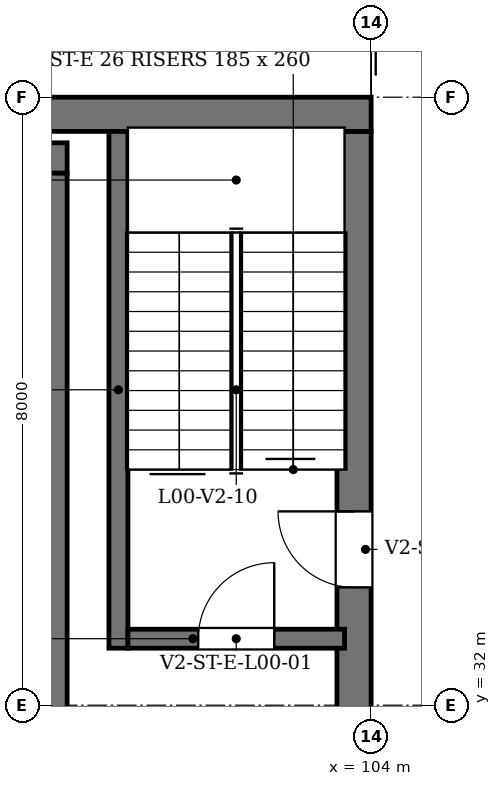
"""IFC4 building model, lengths in metres.
Left out: names, types, materials, properties, quantities, classifications, styles, units other than length and angle.
Written with IfcOpenShell. Run it as: python <this file> out.ifc"""

import sys

from ifc_helpers import new_model, si_unit, direction, frame, frame_2d, origin, place, context, subcontext, project, spatial, rectangle, extrude, element, fill, save


model = new_model("IFC4")
c1 = context("Model", 3, precision=1e-05, world=origin(), true_north=direction((0.0, 1.0)))
c2 = subcontext(c1, "Body", "Model", "MODEL_VIEW")
j1 = project(units=[si_unit("LENGTHUNIT", "METRE"), si_unit("PLANEANGLEUNIT", "RADIAN")], contexts=[c1])
p1 = place(None, origin())
s1 = spatial("IfcSite", under=j1, at=p1, CompositionType="ELEMENT")
p2 = place(p1, origin())
s2 = spatial("IfcBuilding", under=s1, at=p2, CompositionType="ELEMENT")
p3 = place(p2, origin())
s3 = spatial("IfcBuildingStorey", under=s2, at=p3, CompositionType="ELEMENT", Elevation=0.0)
p4 = place(p3, frame((76.0, 39.2, 0.0), z_axis=(0.0, 0.0, 1.0), x_axis=(1.0, 0.0, 0.0)))
e1 = element("IfcWall", 1, at=p4, inside=s3, PredefinedType="SHEAR", context=c2, shape_type="SweptSolid", body=[
    extrude(rectangle(XDim=24.0, YDim=0.4, at=frame_2d((12.0, 0.0))), origin(), (0.0, 0.0, 1.0), 4.55),
])
p5 = place(p3, frame((99.8, 16.4, 0.0), z_axis=(0.0, 0.0, 1.0), x_axis=(0.0, 1.0, 0.0)))
e2 = element("IfcWall", 2, at=p5, inside=s3, PredefinedType="SHEAR", context=c2, shape_type="SweptSolid", body=[
    extrude(rectangle(XDim=22.6, YDim=0.4, at=frame_2d((11.3, 0.0))), origin(), (0.0, 0.0, 1.0), 4.55),
])
p6 = place(p5, frame((7.413, 0.0, 0.0)))
e3 = element("IfcOpeningElement", 3, at=p6, cuts=e2, PredefinedType="OPENING", context=c2, shape_type="SweptSolid", body=[
    extrude(rectangle(XDim=1.8, YDim=2.4, at=frame_2d((0.9, 1.2))), frame((0.0, 0.21, 0.0), z_axis=(0.0, -1.0, 0.0), x_axis=(1.0, 0.0, 0.0)), (0.0, 0.0, 1.0), 0.42),
])
p7 = place(p3, frame((103.775, -1.55, 0.0), z_axis=(0.0, 0.0, 1.0), x_axis=(0.0, 1.0, 0.0)))
e4 = element("IfcWall", 4, at=p7, inside=s3, PredefinedType="SOLIDWALL", context=c2, shape_type="SweptSolid", body=[
    extrude(rectangle(XDim=41.1, YDim=0.45, at=frame_2d((20.55, 0.0))), origin(), (0.0, 0.0, 1.0), 4.8),
])
p8 = place(p7, frame((35.1, 0.0, 0.0)))
e5 = element("IfcOpeningElement", 5, at=p8, cuts=e4, PredefinedType="OPENING", context=c2, shape_type="SweptSolid", body=[
    extrude(rectangle(XDim=1.0, YDim=2.1, at=frame_2d((0.5, 1.05))), frame((0.0, 0.235, 0.0), z_axis=(0.0, -1.0, 0.0), x_axis=(1.0, 0.0, 0.0)), (0.0, 0.0, 1.0), 0.47),
])
p9 = place(p3, frame((72.0, 39.775, 0.0), z_axis=(0.0, 0.0, 1.0), x_axis=(1.0, 0.0, 0.0)))
e6 = element("IfcWall", 6, at=p9, inside=s3, PredefinedType="SOLIDWALL", context=c2, shape_type="SweptSolid", body=[
    extrude(rectangle(XDim=32.0, YDim=0.45, at=frame_2d((16.0, 0.0))), origin(), (0.0, 0.0, 1.0), 4.8),
])
p10 = place(p3, frame((100.675, 32.75, 0.0), z_axis=(0.0, 0.0, 1.0), x_axis=(0.0, 1.0, 0.0)))
e7 = element("IfcWall", 7, at=p10, inside=s3, PredefinedType="SOLIDWALL", context=c2, shape_type="SweptSolid", body=[
    extrude(rectangle(XDim=6.8, YDim=0.25, at=frame_2d((3.4, 0.0))), origin(), (0.0, 0.0, 1.0), 4.8),
])
p11 = place(p3, frame((100.8, 32.875, 0.0), z_axis=(0.0, 0.0, 1.0), x_axis=(1.0, 0.0, 0.0)))
e8 = element("IfcWall", 8, at=p11, inside=s3, PredefinedType="SOLIDWALL", context=c2, shape_type="SweptSolid", body=[
    extrude(rectangle(XDim=2.85, YDim=0.25, at=frame_2d((1.425, 0.0))), origin(), (0.0, 0.0, 1.0), 4.8),
])
p12 = place(p11, frame((0.925, 0.0, 0.0)))
e9 = element("IfcOpeningElement", 9, at=p12, cuts=e8, PredefinedType="OPENING", context=c2, shape_type="SweptSolid", body=[
    extrude(rectangle(XDim=1.0, YDim=2.1, at=frame_2d((0.5, 1.05))), frame((0.0, 0.135, 0.0), z_axis=(0.0, -1.0, 0.0), x_axis=(1.0, 0.0, 0.0)), (0.0, 0.0, 1.0), 0.27),
])
p13 = place(p12, frame((1.0, 0.0, 0.0), z_axis=(0.0, 0.0, 1.0), x_axis=(-1.0, 0.0, 0.0)))
e10 = element("IfcDoor", 10, at=p13, inside=s3, OperationType="SINGLE_SWING_RIGHT", PredefinedType="DOOR", context=c2, shape_type="SweptSolid", body=[
    extrude(rectangle(XDim=1.0, YDim=2.1, at=frame_2d((0.5, 1.05))), frame((0.0, 0.025, 0.0), z_axis=(0.0, -1.0, 0.0), x_axis=(1.0, 0.0, 0.0)), (0.0, 0.0, 1.0), 0.05),
])
fill(e9, e10)
p14 = place(p8, frame((1.0, 0.0, 0.0), z_axis=(0.0, 0.0, 1.0), x_axis=(-1.0, 0.0, 0.0)))
e11 = element("IfcDoor", 11, at=p14, inside=s3, OperationType="SINGLE_SWING_RIGHT", PredefinedType="DOOR", context=c2, shape_type="SweptSolid", body=[
    extrude(rectangle(XDim=1.0, YDim=2.1, at=frame_2d((0.5, 1.05))), frame((0.0, 0.025, 0.0), z_axis=(0.0, -1.0, 0.0), x_axis=(1.0, 0.0, 0.0)), (0.0, 0.0, 1.0), 0.05),
])
fill(e5, e11)
save(model, sys.argv[1])
